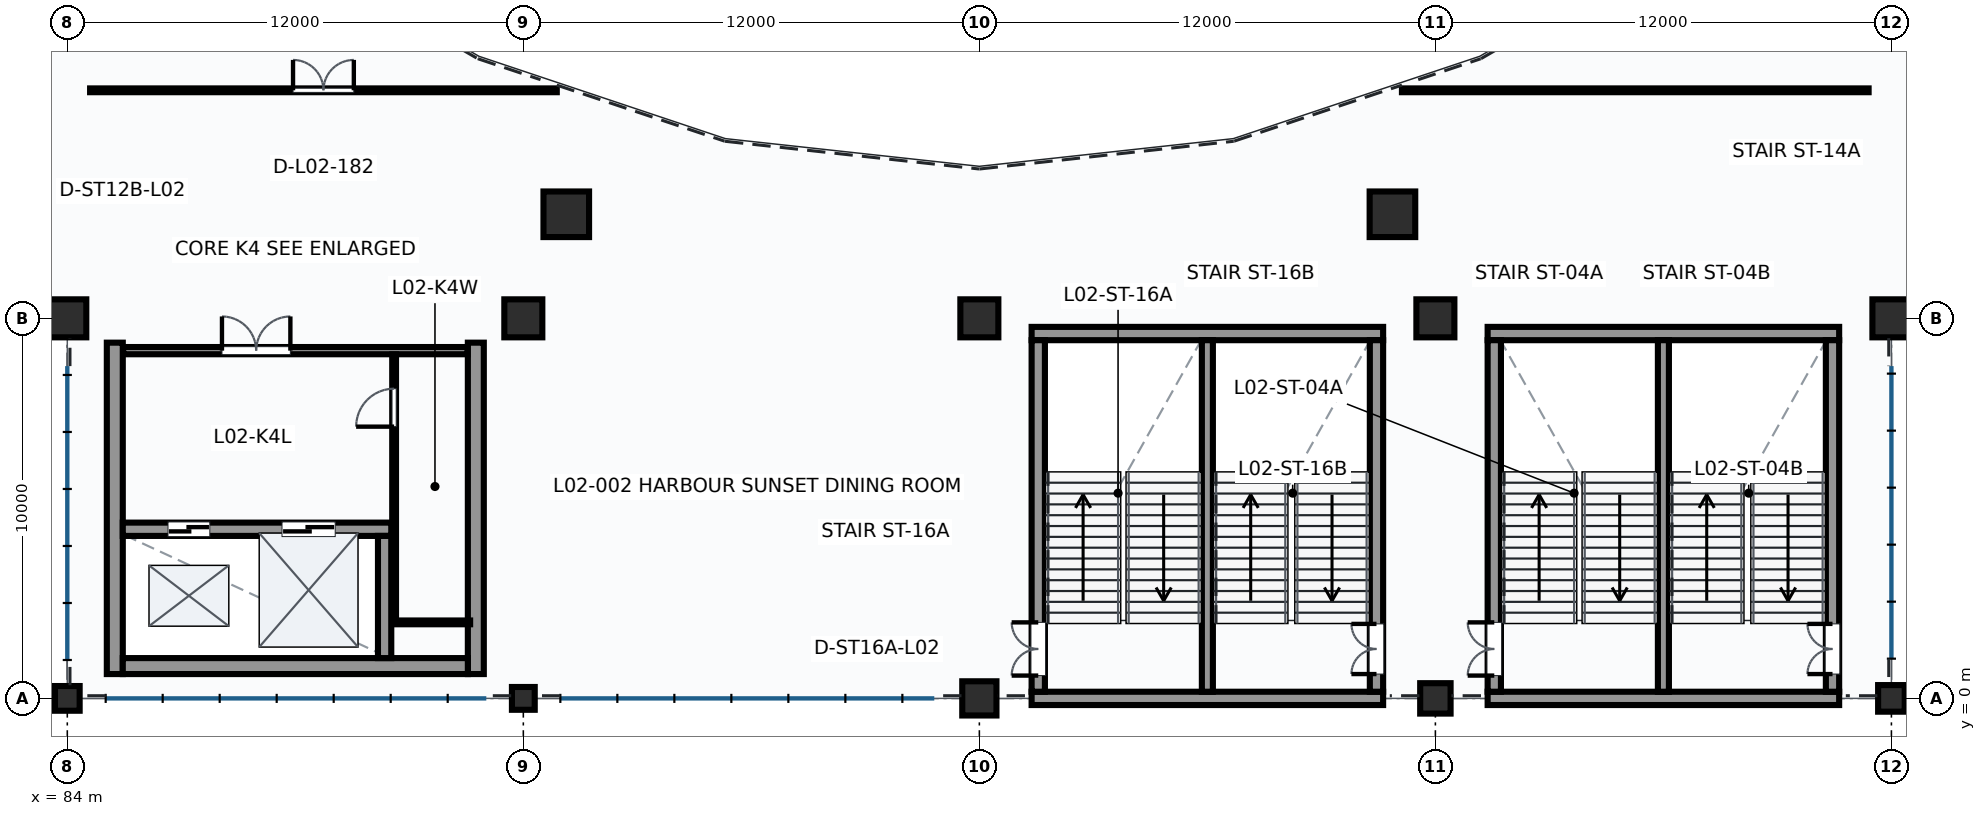
"""IFC4 building model, lengths in metres.
Left out: names, types, materials, properties, quantities, classifications, styles, units other than length and angle.
Written with IfcOpenShell. Run it as: python <this file> out.ifc"""

import sys

from ifc_helpers import new_model, si_unit, direction, frame, frame_2d, origin, origin_2d, place, context, subcontext, project, spatial, rectangle, circle, extrude, element, fill, save


model = new_model("IFC4")
c1 = context("Model", 3, precision=1e-05, world=origin(), true_north=direction((0.0, 1.0)))
c2 = subcontext(c1, "Body", "Model", "MODEL_VIEW")
j1 = project(units=[si_unit("LENGTHUNIT", "METRE"), si_unit("PLANEANGLEUNIT", "RADIAN")], contexts=[c1])
p1 = place(None, origin())
s1 = spatial("IfcSite", under=j1, at=p1, CompositionType="ELEMENT")
p2 = place(p1, origin())
s2 = spatial("IfcBuilding", under=s1, at=p2, CompositionType="ELEMENT")
p3 = place(p2, frame((0.0, 0.0, 10.2)))
s3 = spatial("IfcBuildingStorey", under=s2, at=p3, CompositionType="ELEMENT", Elevation=10.2)
p4 = place(p3, frame((84.0, 0.0, 0.0), z_axis=(0.0, 0.0, 1.0), x_axis=(1.0, 0.0, 0.0)))
e1 = element("IfcColumn", 1, at=p4, inside=s3, PredefinedType="COLUMN", context=c2, shape_type="SweptSolid", body=[
    extrude(rectangle(XDim=0.65, YDim=0.65, at=origin_2d()), origin(), (0.0, 0.0, 1.0), 4.5),
])
p5 = place(p3, frame((84.0, 10.0, 0.0), z_axis=(0.0, 0.0, 1.0), x_axis=(1.0, 0.0, 0.0)))
e2 = element("IfcColumn", 2, at=p5, inside=s3, PredefinedType="COLUMN", context=c2, shape_type="SweptSolid", body=[
    extrude(rectangle(XDim=1.0, YDim=1.0, at=origin_2d()), origin(), (0.0, 0.0, 1.0), 4.5),
])
p6 = place(p3, frame((96.0, 0.0, 0.0), z_axis=(0.0, 0.0, 1.0), x_axis=(1.0, 0.0, 0.0)))
e3 = element("IfcColumn", 3, at=p6, inside=s3, PredefinedType="COLUMN", context=c2, shape_type="SweptSolid", body=[
    extrude(rectangle(XDim=0.6, YDim=0.6, at=origin_2d()), origin(), (0.0, 0.0, 1.0), 4.5),
])
p7 = place(p3, frame((96.0, 10.0, 0.0), z_axis=(0.0, 0.0, 1.0), x_axis=(1.0, 0.0, 0.0)))
e4 = element("IfcColumn", 4, at=p7, inside=s3, PredefinedType="COLUMN", context=c2, shape_type="SweptSolid", body=[
    extrude(rectangle(XDim=1.0, YDim=1.0, at=origin_2d()), origin(), (0.0, 0.0, 1.0), 4.5),
])
p8 = place(p3, frame((108.0, 0.0, 0.0), z_axis=(0.0, 0.0, 1.0), x_axis=(1.0, 0.0, 0.0)))
e5 = element("IfcColumn", 5, at=p8, inside=s3, PredefinedType="COLUMN", context=c2, shape_type="SweptSolid", body=[
    extrude(circle(Radius=0.45, at=origin_2d()), origin(), (0.0, 0.0, 1.0), 4.5),
])
p9 = place(p3, frame((108.0, 10.0, 0.0), z_axis=(0.0, 0.0, 1.0), x_axis=(1.0, 0.0, 0.0)))
e6 = element("IfcColumn", 6, at=p9, inside=s3, PredefinedType="COLUMN", context=c2, shape_type="SweptSolid", body=[
    extrude(rectangle(XDim=1.0, YDim=1.0, at=origin_2d()), origin(), (0.0, 0.0, 1.0), 4.5),
])
p10 = place(p3, frame((120.0, 0.0, 0.0), z_axis=(0.0, 0.0, 1.0), x_axis=(1.0, 0.0, 0.0)))
e7 = element("IfcColumn", 7, at=p10, inside=s3, PredefinedType="COLUMN", context=c2, shape_type="SweptSolid", body=[
    extrude(circle(Radius=0.4, at=origin_2d()), origin(), (0.0, 0.0, 1.0), 4.5),
])
p11 = place(p3, frame((120.0, 10.0, 0.0), z_axis=(0.0, 0.0, 1.0), x_axis=(1.0, 0.0, 0.0)))
e8 = element("IfcColumn", 8, at=p11, inside=s3, PredefinedType="COLUMN", context=c2, shape_type="SweptSolid", body=[
    extrude(rectangle(XDim=1.0, YDim=1.0, at=origin_2d()), origin(), (0.0, 0.0, 1.0), 4.5),
])
p12 = place(p3, frame((132.0, 0.0, 0.0), z_axis=(0.0, 0.0, 1.0), x_axis=(1.0, 0.0, 0.0)))
e9 = element("IfcColumn", 9, at=p12, inside=s3, PredefinedType="COLUMN", context=c2, shape_type="SweptSolid", body=[
    extrude(circle(Radius=0.35, at=origin_2d()), origin(), (0.0, 0.0, 1.0), 4.5),
])
p13 = place(p3, frame((132.0, 10.0, 0.0), z_axis=(0.0, 0.0, 1.0), x_axis=(1.0, 0.0, 0.0)))
e10 = element("IfcColumn", 10, at=p13, inside=s3, PredefinedType="COLUMN", context=c2, shape_type="SweptSolid", body=[
    extrude(rectangle(XDim=1.0, YDim=1.0, at=origin_2d()), origin(), (0.0, 0.0, 1.0), 4.5),
])
for number, where, z_axis, x_axis in (
    (11, (97.13, 12.738, 0.0), (0.0, 0.0, 1.0), (1.0, 0.0, 0.0)),
    (12, (118.87, 12.738, 0.0), (0.0, 0.0, 1.0), (1.0, 0.0, 0.0)),
):
    element("IfcColumn", number, at=place(p3, frame(where, z_axis=z_axis, x_axis=x_axis)), inside=s3, PredefinedType="COLUMN", context=c2, shape_type="SweptSolid", body=[
        extrude(rectangle(XDim=1.2, YDim=1.2, at=origin_2d()), origin(), (0.0, 0.0, 1.0), 4.5),
    ])
p14 = place(p3, frame((121.375, 0.0, 0.0), z_axis=(0.0, 0.0, 1.0), x_axis=(1.0, 0.0, 0.0)))
e13 = element("IfcWall", 13, at=p14, inside=s3, PredefinedType="SHEAR", context=c2, shape_type="SweptSolid", body=[
    extrude(rectangle(XDim=9.25, YDim=0.35, at=frame_2d((4.625, 0.0))), origin(), (0.0, 0.0, 1.0), 3.586),
])
p15 = place(p3, frame((121.375, 9.6, 0.0), z_axis=(0.0, 0.0, 1.0), x_axis=(1.0, 0.0, 0.0)))
e14 = element("IfcWall", 14, at=p15, inside=s3, PredefinedType="SHEAR", context=c2, shape_type="SweptSolid", body=[
    extrude(rectangle(XDim=9.25, YDim=0.35, at=frame_2d((4.625, 0.0))), origin(), (0.0, 0.0, 1.0), 4.5),
])
p16 = place(p3, frame((121.55, 0.175, 0.0), z_axis=(0.0, 0.0, 1.0), x_axis=(0.0, 1.0, 0.0)))
e15 = element("IfcWall", 15, at=p16, inside=s3, PredefinedType="SHEAR", context=c2, shape_type="SweptSolid", body=[
    extrude(rectangle(XDim=9.25, YDim=0.35, at=frame_2d((4.625, 0.0))), origin(), (0.0, 0.0, 1.0), 4.5),
])
p17 = place(p16, frame((0.425, 0.0, 0.0)))
e16 = element("IfcOpeningElement", 16, at=p17, cuts=e15, PredefinedType="OPENING", context=c2, shape_type="SweptSolid", body=[
    extrude(rectangle(XDim=1.4, YDim=2.2, at=frame_2d((0.7, 1.1))), frame((0.0, 0.185, 0.0), z_axis=(0.0, -1.0, 0.0), x_axis=(1.0, 0.0, 0.0)), (0.0, 0.0, 1.0), 0.37),
])
p18 = place(p3, frame((130.45, 0.175, 0.0), z_axis=(0.0, 0.0, 1.0), x_axis=(0.0, 1.0, 0.0)))
e17 = element("IfcWall", 17, at=p18, inside=s3, PredefinedType="SHEAR", context=c2, shape_type="SweptSolid", body=[
    extrude(rectangle(XDim=9.25, YDim=0.35, at=frame_2d((4.625, 0.0))), origin(), (0.0, 0.0, 1.0), 4.5),
])
p19 = place(p18, frame((0.465, 0.0, 0.0)))
e18 = element("IfcOpeningElement", 18, at=p19, cuts=e17, PredefinedType="OPENING", context=c2, shape_type="SweptSolid", body=[
    extrude(rectangle(XDim=1.32, YDim=2.2, at=frame_2d((0.66, 1.1))), frame((0.0, 0.185, 0.0), z_axis=(0.0, -1.0, 0.0), x_axis=(1.0, 0.0, 0.0)), (0.0, 0.0, 1.0), 0.37),
])
p20 = place(p3, frame((126.0, 0.175, 0.0), z_axis=(0.0, 0.0, 1.0), x_axis=(0.0, 1.0, 0.0)))
e19 = element("IfcWall", 19, at=p20, inside=s3, PredefinedType="SHEAR", context=c2, shape_type="SweptSolid", body=[
    extrude(rectangle(XDim=9.25, YDim=0.29, at=frame_2d((4.625, 0.0))), origin(), (0.0, 0.0, 1.0), 4.5),
])
p21 = place(p3, frame((109.375, 0.0, 0.0), z_axis=(0.0, 0.0, 1.0), x_axis=(1.0, 0.0, 0.0)))
e20 = element("IfcWall", 20, at=p21, inside=s3, PredefinedType="SHEAR", context=c2, shape_type="SweptSolid", body=[
    extrude(rectangle(XDim=9.25, YDim=0.35, at=frame_2d((4.625, 0.0))), origin(), (0.0, 0.0, 1.0), 3.437),
])
p22 = place(p3, frame((109.375, 9.6, 0.0), z_axis=(0.0, 0.0, 1.0), x_axis=(1.0, 0.0, 0.0)))
e21 = element("IfcWall", 21, at=p22, inside=s3, PredefinedType="SHEAR", context=c2, shape_type="SweptSolid", body=[
    extrude(rectangle(XDim=9.25, YDim=0.35, at=frame_2d((4.625, 0.0))), origin(), (0.0, 0.0, 1.0), 4.5),
])
p23 = place(p3, frame((109.55, 0.175, 0.0), z_axis=(0.0, 0.0, 1.0), x_axis=(0.0, 1.0, 0.0)))
e22 = element("IfcWall", 22, at=p23, inside=s3, PredefinedType="SHEAR", context=c2, shape_type="SweptSolid", body=[
    extrude(rectangle(XDim=9.25, YDim=0.35, at=frame_2d((4.625, 0.0))), origin(), (0.0, 0.0, 1.0), 4.5),
])
p24 = place(p23, frame((0.425, 0.0, 0.0)))
e23 = element("IfcOpeningElement", 23, at=p24, cuts=e22, PredefinedType="OPENING", context=c2, shape_type="SweptSolid", body=[
    extrude(rectangle(XDim=1.4, YDim=2.2, at=frame_2d((0.7, 1.1))), frame((0.0, 0.185, 0.0), z_axis=(0.0, -1.0, 0.0), x_axis=(1.0, 0.0, 0.0)), (0.0, 0.0, 1.0), 0.37),
])
p25 = place(p3, frame((118.45, 0.175, 0.0), z_axis=(0.0, 0.0, 1.0), x_axis=(0.0, 1.0, 0.0)))
e24 = element("IfcWall", 24, at=p25, inside=s3, PredefinedType="SHEAR", context=c2, shape_type="SweptSolid", body=[
    extrude(rectangle(XDim=9.25, YDim=0.35, at=frame_2d((4.625, 0.0))), origin(), (0.0, 0.0, 1.0), 4.5),
])
p26 = place(p25, frame((0.465, 0.0, 0.0)))
e25 = element("IfcOpeningElement", 25, at=p26, cuts=e24, PredefinedType="OPENING", context=c2, shape_type="SweptSolid", body=[
    extrude(rectangle(XDim=1.32, YDim=2.2, at=frame_2d((0.66, 1.1))), frame((0.0, 0.185, 0.0), z_axis=(0.0, -1.0, 0.0), x_axis=(1.0, 0.0, 0.0)), (0.0, 0.0, 1.0), 0.37),
])
p27 = place(p3, frame((114.0, 0.175, 0.0), z_axis=(0.0, 0.0, 1.0), x_axis=(0.0, 1.0, 0.0)))
e26 = element("IfcWall", 26, at=p27, inside=s3, PredefinedType="SHEAR", context=c2, shape_type="SweptSolid", body=[
    extrude(rectangle(XDim=9.25, YDim=0.29, at=frame_2d((4.625, 0.0))), origin(), (0.0, 0.0, 1.0), 4.5),
])
for number, where, z_axis, x_axis in (
    (27, (85.25, 0.64, 0.0), (0.0, 0.0, 1.0), (0.0, 1.0, 0.0)),
    (28, (94.75, 0.64, 0.0), (0.0, 0.0, 1.0), (0.0, 1.0, 0.0)),
):
    element("IfcWall", number, at=place(p3, frame(where, z_axis=z_axis, x_axis=x_axis)), inside=s3, PredefinedType="SHEAR", context=c2, shape_type="SweptSolid", body=[
        extrude(rectangle(XDim=8.72, YDim=0.42, at=frame_2d((4.36, 0.0))), origin(), (0.0, 0.0, 1.0), 4.5),
    ])
p28 = place(p3, frame((85.46, 0.85, 0.0), z_axis=(0.0, 0.0, 1.0), x_axis=(1.0, 0.0, 0.0)))
e29 = element("IfcWall", 29, at=p28, inside=s3, PredefinedType="SHEAR", context=c2, shape_type="SweptSolid", body=[
    extrude(rectangle(XDim=9.08, YDim=0.42, at=frame_2d((4.54, 0.0))), origin(), (0.0, 0.0, 1.0), 4.5),
])
p29 = place(p3, frame((85.46, 4.45, 0.0), z_axis=(0.0, 0.0, 1.0), x_axis=(1.0, 0.0, 0.0)))
e30 = element("IfcWall", 30, at=p29, inside=s3, PredefinedType="SHEAR", context=c2, shape_type="SweptSolid", body=[
    extrude(rectangle(XDim=7.065, YDim=0.35, at=frame_2d((3.532, 0.0))), origin(), (0.0, 0.0, 1.0), 4.5),
])
p30 = place(p29, frame((1.19, 0.0, 0.0)))
e31 = element("IfcOpeningElement", 31, at=p30, cuts=e30, PredefinedType="OPENING", context=c2, shape_type="SweptSolid", body=[
    extrude(rectangle(XDim=1.1, YDim=2.2, at=frame_2d((0.55, 1.1))), frame((0.0, 0.185, 0.0), z_axis=(0.0, -1.0, 0.0), x_axis=(1.0, 0.0, 0.0)), (0.0, 0.0, 1.0), 0.37),
])
p31 = place(p29, frame((4.19, 0.0, 0.0)))
e32 = element("IfcOpeningElement", 32, at=p31, cuts=e30, PredefinedType="OPENING", context=c2, shape_type="SweptSolid", body=[
    extrude(rectangle(XDim=1.4, YDim=2.3, at=frame_2d((0.7, 1.15))), frame((0.0, 0.185, 0.0), z_axis=(0.0, -1.0, 0.0), x_axis=(1.0, 0.0, 0.0)), (0.0, 0.0, 1.0), 0.37),
])
p32 = place(p3, frame((92.35, 1.06, 0.0), z_axis=(0.0, 0.0, 1.0), x_axis=(0.0, 1.0, 0.0)))
e33 = element("IfcWall", 33, at=p32, inside=s3, PredefinedType="SHEAR", context=c2, shape_type="SweptSolid", body=[
    extrude(rectangle(XDim=3.215, YDim=0.35, at=frame_2d((1.607, 0.0))), origin(), (0.0, 0.0, 1.0), 4.5),
])
p33 = place(p3, frame((85.47, 9.15, 0.0), z_axis=(0.0, 0.0, 1.0), x_axis=(1.0, 0.0, 0.0)))
e34 = element("IfcWall", 34, at=p33, inside=s3, PredefinedType="PARTITIONING", context=c2, shape_type="SweptSolid", body=[
    extrude(rectangle(XDim=9.06, YDim=0.19, at=frame_2d((4.53, 0.0))), origin(), (0.0, 0.0, 1.0), 4.15),
])
p34 = place(p33, frame((2.6, 0.0, 0.0)))
e35 = element("IfcOpeningElement", 35, at=p34, cuts=e34, PredefinedType="OPENING", context=c2, shape_type="SweptSolid", body=[
    extrude(rectangle(XDim=1.8, YDim=2.3, at=frame_2d((0.9, 1.15))), frame((0.0, 0.105, 0.0), z_axis=(0.0, -1.0, 0.0), x_axis=(1.0, 0.0, 0.0)), (0.0, 0.0, 1.0), 0.21),
])
p35 = place(p3, frame((92.6, 2.0, 0.0), z_axis=(0.0, 0.0, 1.0), x_axis=(0.0, 1.0, 0.0)))
e36 = element("IfcWall", 36, at=p35, inside=s3, PredefinedType="PARTITIONING", context=c2, shape_type="SweptSolid", body=[
    extrude(rectangle(XDim=7.05, YDim=0.1, at=frame_2d((3.525, 0.0))), origin(), (0.0, 0.0, 1.0), 4.15),
])
p36 = place(p35, frame((5.15, 0.0, 0.0)))
e37 = element("IfcOpeningElement", 37, at=p36, cuts=e36, PredefinedType="OPENING", context=c2, shape_type="SweptSolid", body=[
    extrude(rectangle(XDim=1.0, YDim=2.1, at=frame_2d((0.5, 1.05))), frame((0.0, 0.06, 0.0), z_axis=(0.0, -1.0, 0.0), x_axis=(1.0, 0.0, 0.0)), (0.0, 0.0, 1.0), 0.12),
])
p37 = place(p3, frame((92.6, 2.0, 0.0), z_axis=(0.0, 0.0, 1.0), x_axis=(1.0, 0.0, 0.0)))
e38 = element("IfcWall", 38, at=p37, inside=s3, PredefinedType="PARTITIONING", context=c2, shape_type="SweptSolid", body=[
    extrude(rectangle(XDim=2.0, YDim=0.1, at=frame_2d((1.0, 0.0))), origin(), (0.0, 0.0, 1.0), 4.15),
])
p38 = place(p3, frame((84.6, 16.0, 0.0), z_axis=(0.0, 0.0, 1.0), x_axis=(1.0, 0.0, 0.0)))
e39 = element("IfcWall", 39, at=p38, inside=s3, PredefinedType="PARTITIONING", context=c2, shape_type="SweptSolid", body=[
    extrude(rectangle(XDim=12.28, YDim=0.1, at=frame_2d((6.14, 0.0))), origin(), (0.0, 0.0, 1.0), 4.15),
])
p39 = place(p38, frame((5.34, 0.0, 0.0)))
e40 = element("IfcOpeningElement", 40, at=p39, cuts=e39, PredefinedType="OPENING", context=c2, shape_type="SweptSolid", body=[
    extrude(rectangle(XDim=1.6, YDim=2.2, at=frame_2d((0.8, 1.1))), frame((0.0, 0.06, 0.0), z_axis=(0.0, -1.0, 0.0), x_axis=(1.0, 0.0, 0.0)), (0.0, 0.0, 1.0), 0.12),
])
p40 = place(p3, frame((119.12, 16.0, 0.0), z_axis=(0.0, 0.0, 1.0), x_axis=(1.0, 0.0, 0.0)))
e41 = element("IfcWall", 41, at=p40, inside=s3, PredefinedType="PARTITIONING", context=c2, shape_type="SweptSolid", body=[
    extrude(rectangle(XDim=12.28, YDim=0.1, at=frame_2d((6.14, 0.0))), origin(), (0.0, 0.0, 1.0), 4.15),
])
p41 = place(p17, frame((1.4, 0.0, 0.0), z_axis=(0.0, 0.0, 1.0), x_axis=(-1.0, 0.0, 0.0)))
e42 = element("IfcDoor", 42, at=p41, inside=s3, OperationType="DOUBLE_DOOR_SINGLE_SWING", PredefinedType="DOOR", context=c2, shape_type="SweptSolid", body=[
    extrude(rectangle(XDim=1.4, YDim=2.2, at=frame_2d((0.7, 1.1))), frame((0.0, 0.025, 0.0), z_axis=(0.0, -1.0, 0.0), x_axis=(1.0, 0.0, 0.0)), (0.0, 0.0, 1.0), 0.05),
])
fill(e16, e42)
p42 = place(p19, origin())
e43 = element("IfcDoor", 43, at=p42, inside=s3, OperationType="DOUBLE_DOOR_SINGLE_SWING", PredefinedType="DOOR", context=c2, shape_type="SweptSolid", body=[
    extrude(rectangle(XDim=1.32, YDim=2.2, at=frame_2d((0.66, 1.1))), frame((0.0, 0.025, 0.0), z_axis=(0.0, -1.0, 0.0), x_axis=(1.0, 0.0, 0.0)), (0.0, 0.0, 1.0), 0.05),
])
fill(e18, e43)
p43 = place(p24, frame((1.4, 0.0, 0.0), z_axis=(0.0, 0.0, 1.0), x_axis=(-1.0, 0.0, 0.0)))
e44 = element("IfcDoor", 44, at=p43, inside=s3, OperationType="DOUBLE_DOOR_SINGLE_SWING", PredefinedType="DOOR", context=c2, shape_type="SweptSolid", body=[
    extrude(rectangle(XDim=1.4, YDim=2.2, at=frame_2d((0.7, 1.1))), frame((0.0, 0.025, 0.0), z_axis=(0.0, -1.0, 0.0), x_axis=(1.0, 0.0, 0.0)), (0.0, 0.0, 1.0), 0.05),
])
fill(e23, e44)
p44 = place(p26, origin())
e45 = element("IfcDoor", 45, at=p44, inside=s3, OperationType="DOUBLE_DOOR_SINGLE_SWING", PredefinedType="DOOR", context=c2, shape_type="SweptSolid", body=[
    extrude(rectangle(XDim=1.32, YDim=2.2, at=frame_2d((0.66, 1.1))), frame((0.0, 0.025, 0.0), z_axis=(0.0, -1.0, 0.0), x_axis=(1.0, 0.0, 0.0)), (0.0, 0.0, 1.0), 0.05),
])
fill(e25, e45)
p45 = place(p30, origin())
e46 = element("IfcDoor", 46, at=p45, inside=s3, OperationType="SLIDING_TO_LEFT", PredefinedType="DOOR", context=c2, shape_type="SweptSolid", body=[
    extrude(rectangle(XDim=1.1, YDim=2.2, at=frame_2d((0.55, 1.1))), frame((0.0, 0.025, 0.0), z_axis=(0.0, -1.0, 0.0), x_axis=(1.0, 0.0, 0.0)), (0.0, 0.0, 1.0), 0.05),
])
fill(e31, e46)
p46 = place(p31, origin())
e47 = element("IfcDoor", 47, at=p46, inside=s3, OperationType="SLIDING_TO_LEFT", PredefinedType="DOOR", context=c2, shape_type="SweptSolid", body=[
    extrude(rectangle(XDim=1.4, YDim=2.3, at=frame_2d((0.7, 1.15))), frame((0.0, 0.025, 0.0), z_axis=(0.0, -1.0, 0.0), x_axis=(1.0, 0.0, 0.0)), (0.0, 0.0, 1.0), 0.05),
])
fill(e32, e47)
p47 = place(p34, origin())
e48 = element("IfcDoor", 48, at=p47, inside=s3, OperationType="DOUBLE_DOOR_SINGLE_SWING", PredefinedType="DOOR", context=c2, shape_type="SweptSolid", body=[
    extrude(rectangle(XDim=1.8, YDim=2.3, at=frame_2d((0.9, 1.15))), frame((0.0, 0.025, 0.0), z_axis=(0.0, -1.0, 0.0), x_axis=(1.0, 0.0, 0.0)), (0.0, 0.0, 1.0), 0.05),
])
fill(e35, e48)
p48 = place(p36, origin())
e49 = element("IfcDoor", 49, at=p48, inside=s3, OperationType="SINGLE_SWING_LEFT", PredefinedType="DOOR", context=c2, shape_type="SweptSolid", body=[
    extrude(rectangle(XDim=1.0, YDim=2.1, at=frame_2d((0.5, 1.05))), frame((0.0, 0.025, 0.0), z_axis=(0.0, -1.0, 0.0), x_axis=(1.0, 0.0, 0.0)), (0.0, 0.0, 1.0), 0.05),
])
fill(e37, e49)
p49 = place(p39, origin())
e50 = element("IfcDoor", 50, at=p49, inside=s3, OperationType="DOUBLE_DOOR_SINGLE_SWING", PredefinedType="DOOR", context=c2, shape_type="SweptSolid", body=[
    extrude(rectangle(XDim=1.6, YDim=2.2, at=frame_2d((0.8, 1.1))), frame((0.0, 0.025, 0.0), z_axis=(0.0, -1.0, 0.0), x_axis=(1.0, 0.0, 0.0)), (0.0, 0.0, 1.0), 0.05),
])
fill(e40, e50)
save(model, sys.argv[1])
